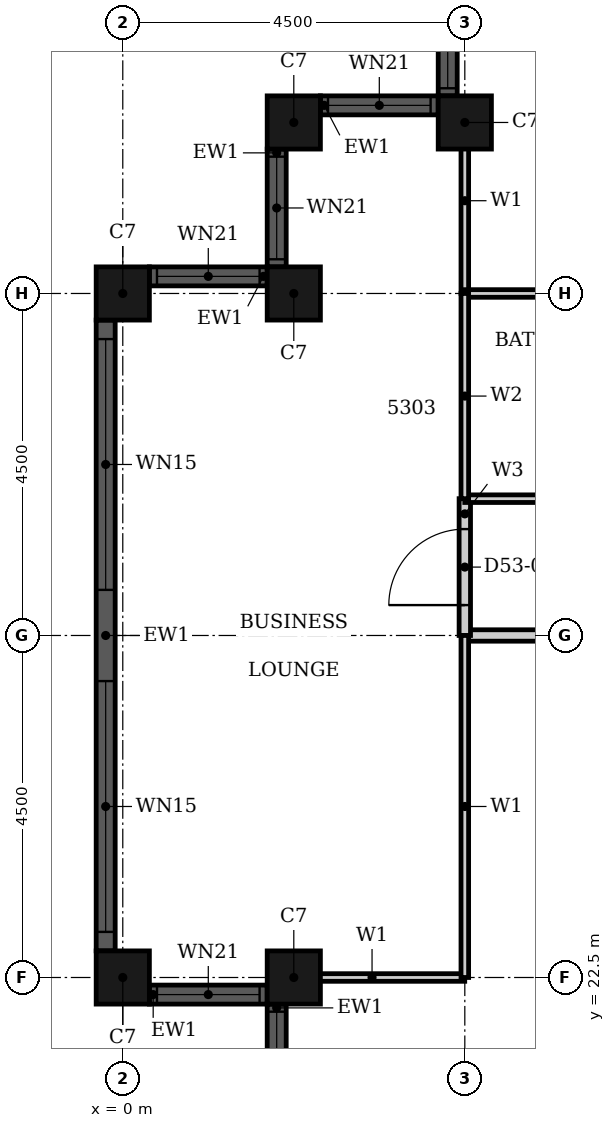
"""IFC4 building model, lengths in metres.
Left out: names, types, materials, properties, quantities, classifications, styles, units other than length and angle.
Written with IfcOpenShell. Run it as: python <this file> out.ifc"""

import sys

from ifc_helpers import new_model, si_unit, direction, frame, frame_2d, origin, origin_2d, place, context, subcontext, project, spatial, rectangle, hollow_rectangle, extrude, element, fill, save


model = new_model("IFC4")
c1 = context("Model", 3, precision=1e-05, world=origin(), true_north=direction((0.0, 1.0)))
c2 = subcontext(c1, "Body", "Model", "MODEL_VIEW")
j1 = project(units=[si_unit("LENGTHUNIT", "METRE"), si_unit("PLANEANGLEUNIT", "RADIAN")], contexts=[c1])
p1 = place(None, origin())
s1 = spatial("IfcSite", under=j1, at=p1, CompositionType="ELEMENT")
p2 = place(p1, origin())
s2 = spatial("IfcBuilding", under=s1, at=p2, CompositionType="ELEMENT")
p3 = place(p2, frame((0.0, 0.0, 210.9)))
s3 = spatial("IfcBuildingStorey", under=s2, at=p3, CompositionType="ELEMENT", Elevation=210.9)
for number, where, z_axis, x_axis in (
    (1, (4.5, 33.75, 0.0), (0.0, 0.0, 1.0), (1.0, 0.0, 0.0)),
    (2, (2.25, 33.75, 0.0), (0.0, 0.0, 1.0), (1.0, 0.0, 0.0)),
    (3, (2.25, 31.5, 0.0), (0.0, 0.0, 1.0), (1.0, 0.0, 0.0)),
    (4, (0.0, 31.5, 0.0), (0.0, 0.0, 1.0), (1.0, 0.0, 0.0)),
    (5, (0.0, 22.5, 0.0), (0.0, 0.0, 1.0), (1.0, 0.0, 0.0)),
    (6, (2.25, 22.5, 0.0), (0.0, 0.0, 1.0), (1.0, 0.0, 0.0)),
):
    element("IfcColumn", number, at=place(p3, frame(where, z_axis=z_axis, x_axis=x_axis)), inside=s3, PredefinedType="COLUMN", context=c2, shape_type="SweptSolid", body=[
        extrude(hollow_rectangle(XDim=0.7, YDim=0.7, WallThickness=0.022, at=origin_2d()), origin(), (0.0, 0.0, 1.0), 3.7),
    ])
p4 = place(p3, frame((4.275, 35.65, 0.0), z_axis=(0.0, 0.0, 1.0), x_axis=(0.0, -1.0, 0.0)))
e7 = element("IfcWall", 7, at=p4, inside=s3, PredefinedType="SOLIDWALL", context=c2, shape_type="SweptSolid", body=[
    extrude(rectangle(XDim=1.55, YDim=0.25, at=frame_2d((0.775, 0.0))), origin(), (0.0, 0.0, 1.0), 3.7),
])
p5 = place(p4, frame((0.1, 0.0, 0.9)))
e8 = element("IfcOpeningElement", 8, at=p5, cuts=e7, PredefinedType="OPENING", context=c2, shape_type="SweptSolid", body=[
    extrude(rectangle(XDim=1.35, YDim=1.85, at=frame_2d((0.675, 0.925))), frame((0.0, 0.135, 0.0), z_axis=(0.0, -1.0, 0.0), x_axis=(1.0, 0.0, 0.0)), (0.0, 0.0, 1.0), 0.27),
])
p6 = place(p3, frame((4.15, 33.975, 0.0), z_axis=(0.0, 0.0, 1.0), x_axis=(-1.0, 0.0, 0.0)))
e9 = element("IfcWall", 9, at=p6, inside=s3, PredefinedType="SOLIDWALL", context=c2, shape_type="SweptSolid", body=[
    extrude(rectangle(XDim=1.55, YDim=0.25, at=frame_2d((0.775, 0.0))), origin(), (0.0, 0.0, 1.0), 3.7),
])
p7 = place(p6, frame((0.1, 0.0, 0.9)))
e10 = element("IfcOpeningElement", 10, at=p7, cuts=e9, PredefinedType="OPENING", context=c2, shape_type="SweptSolid", body=[
    extrude(rectangle(XDim=1.35, YDim=1.85, at=frame_2d((0.675, 0.925))), frame((0.0, 0.135, 0.0), z_axis=(0.0, -1.0, 0.0), x_axis=(1.0, 0.0, 0.0)), (0.0, 0.0, 1.0), 0.27),
])
p8 = place(p3, frame((2.025, 33.4, 0.0), z_axis=(0.0, 0.0, 1.0), x_axis=(0.0, -1.0, 0.0)))
e11 = element("IfcWall", 11, at=p8, inside=s3, PredefinedType="SOLIDWALL", context=c2, shape_type="SweptSolid", body=[
    extrude(rectangle(XDim=1.55, YDim=0.25, at=frame_2d((0.775, 0.0))), origin(), (0.0, 0.0, 1.0), 3.7),
])
p9 = place(p8, frame((0.1, 0.0, 0.9)))
e12 = element("IfcOpeningElement", 12, at=p9, cuts=e11, PredefinedType="OPENING", context=c2, shape_type="SweptSolid", body=[
    extrude(rectangle(XDim=1.35, YDim=1.85, at=frame_2d((0.675, 0.925))), frame((0.0, 0.135, 0.0), z_axis=(0.0, -1.0, 0.0), x_axis=(1.0, 0.0, 0.0)), (0.0, 0.0, 1.0), 0.27),
])
p10 = place(p3, frame((1.9, 31.725, 0.0), z_axis=(0.0, 0.0, 1.0), x_axis=(-1.0, 0.0, 0.0)))
e13 = element("IfcWall", 13, at=p10, inside=s3, PredefinedType="SOLIDWALL", context=c2, shape_type="SweptSolid", body=[
    extrude(rectangle(XDim=1.55, YDim=0.25, at=frame_2d((0.775, 0.0))), origin(), (0.0, 0.0, 1.0), 3.7),
])
p11 = place(p10, frame((0.1, 0.0, 0.9)))
e14 = element("IfcOpeningElement", 14, at=p11, cuts=e13, PredefinedType="OPENING", context=c2, shape_type="SweptSolid", body=[
    extrude(rectangle(XDim=1.35, YDim=1.85, at=frame_2d((0.675, 0.925))), frame((0.0, 0.135, 0.0), z_axis=(0.0, -1.0, 0.0), x_axis=(1.0, 0.0, 0.0)), (0.0, 0.0, 1.0), 0.27),
])
p12 = place(p3, frame((-0.225, 31.15, 0.0), z_axis=(0.0, 0.0, 1.0), x_axis=(0.0, -1.0, 0.0)))
e15 = element("IfcWall", 15, at=p12, inside=s3, PredefinedType="SOLIDWALL", context=c2, shape_type="SweptSolid", body=[
    extrude(rectangle(XDim=8.3, YDim=0.25, at=frame_2d((4.15, 0.0))), origin(), (0.0, 0.0, 1.0), 3.7),
])
p13 = place(p12, frame((0.25, 0.0, 0.45)))
e16 = element("IfcOpeningElement", 16, at=p13, cuts=e15, PredefinedType="OPENING", context=c2, shape_type="SweptSolid", body=[
    extrude(rectangle(XDim=3.3, YDim=2.3, at=frame_2d((1.65, 1.15))), frame((0.0, 0.135, 0.0), z_axis=(0.0, -1.0, 0.0), x_axis=(1.0, 0.0, 0.0)), (0.0, 0.0, 1.0), 0.27),
])
p14 = place(p12, frame((4.75, 0.0, 0.45)))
e17 = element("IfcOpeningElement", 17, at=p14, cuts=e15, PredefinedType="OPENING", context=c2, shape_type="SweptSolid", body=[
    extrude(rectangle(XDim=3.3, YDim=2.3, at=frame_2d((1.65, 1.15))), frame((0.0, 0.135, 0.0), z_axis=(0.0, -1.0, 0.0), x_axis=(1.0, 0.0, 0.0)), (0.0, 0.0, 1.0), 0.27),
])
p15 = place(p3, frame((0.35, 22.275, 0.0), z_axis=(0.0, 0.0, 1.0), x_axis=(1.0, 0.0, 0.0)))
e18 = element("IfcWall", 18, at=p15, inside=s3, PredefinedType="SOLIDWALL", context=c2, shape_type="SweptSolid", body=[
    extrude(rectangle(XDim=1.55, YDim=0.25, at=frame_2d((0.775, 0.0))), origin(), (0.0, 0.0, 1.0), 3.7),
])
p16 = place(p15, frame((0.1, 0.0, 0.9)))
e19 = element("IfcOpeningElement", 19, at=p16, cuts=e18, PredefinedType="OPENING", context=c2, shape_type="SweptSolid", body=[
    extrude(rectangle(XDim=1.35, YDim=1.85, at=frame_2d((0.675, 0.925))), frame((0.0, 0.135, 0.0), z_axis=(0.0, -1.0, 0.0), x_axis=(1.0, 0.0, 0.0)), (0.0, 0.0, 1.0), 0.27),
])
p17 = place(p3, frame((2.025, 22.15, 0.0), z_axis=(0.0, 0.0, 1.0), x_axis=(0.0, -1.0, 0.0)))
e20 = element("IfcWall", 20, at=p17, inside=s3, PredefinedType="SOLIDWALL", context=c2, shape_type="SweptSolid", body=[
    extrude(rectangle(XDim=1.55, YDim=0.25, at=frame_2d((0.775, 0.0))), origin(), (0.0, 0.0, 1.0), 3.7),
])
p18 = place(p17, frame((0.1, 0.0, 0.9)))
e21 = element("IfcOpeningElement", 21, at=p18, cuts=e20, PredefinedType="OPENING", context=c2, shape_type="SweptSolid", body=[
    extrude(rectangle(XDim=1.35, YDim=1.85, at=frame_2d((0.675, 0.925))), frame((0.0, 0.135, 0.0), z_axis=(0.0, -1.0, 0.0), x_axis=(1.0, 0.0, 0.0)), (0.0, 0.0, 1.0), 0.27),
])
p19 = place(p3, frame((4.5, 27.0, 0.0), z_axis=(0.0, 0.0, 1.0), x_axis=(1.0, 0.0, 0.0)))
e22 = element("IfcWall", 22, at=p19, inside=s3, PredefinedType="PARTITIONING", context=c2, shape_type="SweptSolid", body=[
    extrude(rectangle(XDim=13.5, YDim=0.15, at=frame_2d((6.75, 0.0))), origin(), (0.0, 0.0, 1.0), 2.68),
])
p20 = place(p19, frame((5.35, 0.0, 0.0)))
e23 = element("IfcOpeningElement", 23, at=p20, cuts=e22, PredefinedType="OPENING", context=c2, shape_type="SweptSolid", body=[
    extrude(rectangle(XDim=1.0, YDim=2.1, at=frame_2d((0.5, 1.05))), frame((0.0, 0.085, 0.0), z_axis=(0.0, -1.0, 0.0), x_axis=(1.0, 0.0, 0.0)), (0.0, 0.0, 1.0), 0.17),
])
p21 = place(p3, frame((4.5, 27.0, 0.0), z_axis=(0.0, 0.0, 1.0), x_axis=(0.0, 1.0, 0.0)))
e24 = element("IfcWall", 24, at=p21, inside=s3, PredefinedType="PARTITIONING", context=c2, shape_type="SweptSolid", body=[
    extrude(rectangle(XDim=1.8, YDim=0.15, at=frame_2d((0.9, 0.0))), origin(), (0.0, 0.0, 1.0), 3.4),
])
p22 = place(p21, frame((0.4, 0.0, 0.0)))
e25 = element("IfcOpeningElement", 25, at=p22, cuts=e24, PredefinedType="OPENING", context=c2, shape_type="SweptSolid", body=[
    extrude(rectangle(XDim=1.0, YDim=2.1, at=frame_2d((0.5, 1.05))), frame((0.0, 0.085, 0.0), z_axis=(0.0, -1.0, 0.0), x_axis=(1.0, 0.0, 0.0)), (0.0, 0.0, 1.0), 0.17),
])
p23 = place(p3, frame((2.06, 22.5, 0.0), z_axis=(0.0, 0.0, 1.0), x_axis=(1.0, 0.0, 0.0)))
e26 = element("IfcWall", 26, at=p23, inside=s3, PredefinedType="PARTITIONING", context=c2, shape_type="SweptSolid", body=[
    extrude(rectangle(XDim=2.439, YDim=0.1, at=frame_2d((1.219, 0.0))), origin(), (0.0, 0.0, 1.0), 2.68),
])
p24 = place(p3, frame((4.5, 31.501, 0.0), z_axis=(0.0, 0.0, 1.0), x_axis=(0.0, 1.0, 0.0)))
e27 = element("IfcWall", 27, at=p24, inside=s3, PredefinedType="PARTITIONING", context=c2, shape_type="SweptSolid", body=[
    extrude(rectangle(XDim=2.439, YDim=0.1, at=frame_2d((1.219, 0.0))), origin(), (0.0, 0.0, 1.0), 3.4),
])
p25 = place(p3, frame((4.5, 22.5, 0.0), z_axis=(0.0, 0.0, 1.0), x_axis=(0.0, 1.0, 0.0)))
e28 = element("IfcWall", 28, at=p25, inside=s3, PredefinedType="PARTITIONING", context=c2, shape_type="SweptSolid", body=[
    extrude(rectangle(XDim=4.5, YDim=0.1, at=frame_2d((2.25, 0.0))), origin(), (0.0, 0.0, 1.0), 3.4),
])
p26 = place(p3, frame((4.5, 28.8, 0.0), z_axis=(0.0, 0.0, 1.0), x_axis=(1.0, 0.0, 0.0)))
e29 = element("IfcWall", 29, at=p26, inside=s3, PredefinedType="PARTITIONING", context=c2, shape_type="SweptSolid", body=[
    extrude(rectangle(XDim=2.4, YDim=0.1, at=frame_2d((1.2, 0.0))), origin(), (0.0, 0.0, 1.0), 3.4),
])
p27 = place(p3, frame((4.5, 31.5, 0.0), z_axis=(0.0, 0.0, 1.0), x_axis=(1.0, 0.0, 0.0)))
e30 = element("IfcWall", 30, at=p27, inside=s3, PredefinedType="PARTITIONING", context=c2, shape_type="SweptSolid", body=[
    extrude(rectangle(XDim=2.4, YDim=0.1, at=frame_2d((1.2, 0.0))), origin(), (0.0, 0.0, 1.0), 2.68),
])
p28 = place(p3, frame((4.5, 28.8, 0.0), z_axis=(0.0, 0.0, 1.0), x_axis=(0.0, 1.0, 0.0)))
e31 = element("IfcWall", 31, at=p28, inside=s3, PredefinedType="PARTITIONING", context=c2, shape_type="SweptSolid", body=[
    extrude(rectangle(XDim=2.7, YDim=0.1, at=frame_2d((1.35, 0.0))), origin(), (0.0, 0.0, 1.0), 3.4),
])
p29 = place(p5, origin())
e32 = element("IfcWindow", 32, at=p29, inside=s3, PartitioningType="SINGLE_PANEL", PredefinedType="WINDOW", context=c2, shape_type="SweptSolid", body=[
    extrude(rectangle(XDim=1.35, YDim=1.85, at=frame_2d((0.675, 0.925))), frame((0.0, 0.03, 0.0), z_axis=(0.0, -1.0, 0.0), x_axis=(1.0, 0.0, 0.0)), (0.0, 0.0, 1.0), 0.06),
])
fill(e8, e32)
p30 = place(p7, origin())
e33 = element("IfcWindow", 33, at=p30, inside=s3, PartitioningType="SINGLE_PANEL", PredefinedType="WINDOW", context=c2, shape_type="SweptSolid", body=[
    extrude(rectangle(XDim=1.35, YDim=1.85, at=frame_2d((0.675, 0.925))), frame((0.0, 0.03, 0.0), z_axis=(0.0, -1.0, 0.0), x_axis=(1.0, 0.0, 0.0)), (0.0, 0.0, 1.0), 0.06),
])
fill(e10, e33)
p31 = place(p9, origin())
e34 = element("IfcWindow", 34, at=p31, inside=s3, PartitioningType="SINGLE_PANEL", PredefinedType="WINDOW", context=c2, shape_type="SweptSolid", body=[
    extrude(rectangle(XDim=1.35, YDim=1.85, at=frame_2d((0.675, 0.925))), frame((0.0, 0.03, 0.0), z_axis=(0.0, -1.0, 0.0), x_axis=(1.0, 0.0, 0.0)), (0.0, 0.0, 1.0), 0.06),
])
fill(e12, e34)
p32 = place(p11, origin())
e35 = element("IfcWindow", 35, at=p32, inside=s3, PartitioningType="SINGLE_PANEL", PredefinedType="WINDOW", context=c2, shape_type="SweptSolid", body=[
    extrude(rectangle(XDim=1.35, YDim=1.85, at=frame_2d((0.675, 0.925))), frame((0.0, 0.03, 0.0), z_axis=(0.0, -1.0, 0.0), x_axis=(1.0, 0.0, 0.0)), (0.0, 0.0, 1.0), 0.06),
])
fill(e14, e35)
p33 = place(p13, origin())
e36 = element("IfcWindow", 36, at=p33, inside=s3, PartitioningType="SINGLE_PANEL", PredefinedType="WINDOW", context=c2, shape_type="SweptSolid", body=[
    extrude(rectangle(XDim=3.3, YDim=2.3, at=frame_2d((1.65, 1.15))), frame((0.0, 0.03, 0.0), z_axis=(0.0, -1.0, 0.0), x_axis=(1.0, 0.0, 0.0)), (0.0, 0.0, 1.0), 0.06),
])
fill(e16, e36)
p34 = place(p14, origin())
e37 = element("IfcWindow", 37, at=p34, inside=s3, PartitioningType="SINGLE_PANEL", PredefinedType="WINDOW", context=c2, shape_type="SweptSolid", body=[
    extrude(rectangle(XDim=3.3, YDim=2.3, at=frame_2d((1.65, 1.15))), frame((0.0, 0.03, 0.0), z_axis=(0.0, -1.0, 0.0), x_axis=(1.0, 0.0, 0.0)), (0.0, 0.0, 1.0), 0.06),
])
fill(e17, e37)
p35 = place(p16, origin())
e38 = element("IfcWindow", 38, at=p35, inside=s3, PartitioningType="SINGLE_PANEL", PredefinedType="WINDOW", context=c2, shape_type="SweptSolid", body=[
    extrude(rectangle(XDim=1.35, YDim=1.85, at=frame_2d((0.675, 0.925))), frame((0.0, 0.03, 0.0), z_axis=(0.0, -1.0, 0.0), x_axis=(1.0, 0.0, 0.0)), (0.0, 0.0, 1.0), 0.06),
])
fill(e19, e38)
p36 = place(p18, origin())
e39 = element("IfcWindow", 39, at=p36, inside=s3, PartitioningType="SINGLE_PANEL", PredefinedType="WINDOW", context=c2, shape_type="SweptSolid", body=[
    extrude(rectangle(XDim=1.35, YDim=1.85, at=frame_2d((0.675, 0.925))), frame((0.0, 0.03, 0.0), z_axis=(0.0, -1.0, 0.0), x_axis=(1.0, 0.0, 0.0)), (0.0, 0.0, 1.0), 0.06),
])
fill(e21, e39)
p37 = place(p22, origin())
e40 = element("IfcDoor", 40, at=p37, inside=s3, OperationType="SINGLE_SWING_LEFT", PredefinedType="DOOR", context=c2, shape_type="SweptSolid", body=[
    extrude(rectangle(XDim=1.0, YDim=2.1, at=frame_2d((0.5, 1.05))), frame((0.0, 0.025, 0.0), z_axis=(0.0, -1.0, 0.0), x_axis=(1.0, 0.0, 0.0)), (0.0, 0.0, 1.0), 0.05),
])
fill(e25, e40)
save(model, sys.argv[1])
